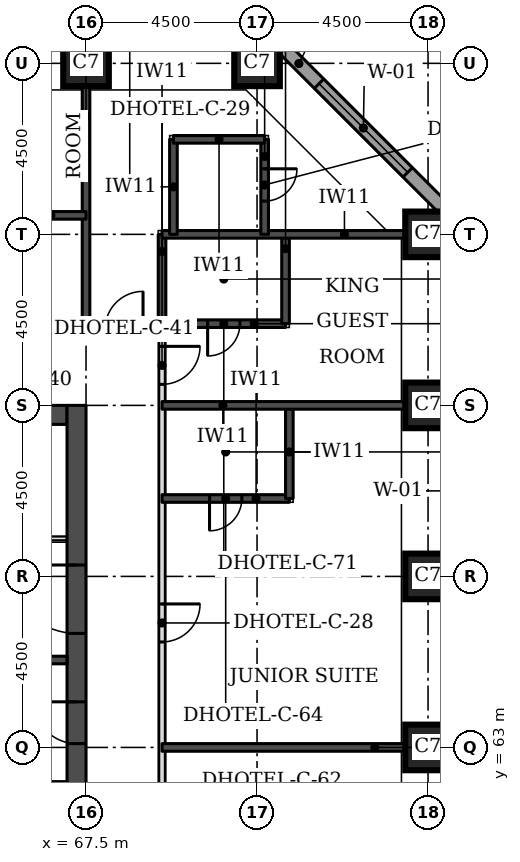
"""IFC4 building model, lengths in metres.
Left out: names, types, materials, properties, quantities, classifications, styles, units other than length and angle.
Written with IfcOpenShell. Run it as: python <this file> out.ifc"""

import sys

from ifc_helpers import new_model, si_unit, direction, frame, frame_2d, origin, origin_2d, place, context, subcontext, project, spatial, rectangle, extrude, element, fill, save


model = new_model("IFC4")
c1 = context("Model", 3, precision=1e-05, world=origin(), true_north=direction((0.0, 1.0)))
c2 = subcontext(c1, "Body", "Model", "MODEL_VIEW")
j1 = project(units=[si_unit("LENGTHUNIT", "METRE"), si_unit("PLANEANGLEUNIT", "RADIAN")], contexts=[c1])
p1 = place(None, origin())
s1 = spatial("IfcSite", under=j1, at=p1, CompositionType="ELEMENT")
p2 = place(p1, origin())
s2 = spatial("IfcBuilding", under=s1, at=p2, CompositionType="ELEMENT")
p3 = place(p2, frame((0.0, 0.0, 33.0)))
s3 = spatial("IfcBuildingStorey", under=s2, at=p3, CompositionType="ELEMENT", Elevation=33.0)
for number, where, z_axis, x_axis in (
    (1, (76.5, 63.0, 0.0), (0.0, 0.0, 1.0), (1.0, 0.0, 0.0)),
    (2, (76.5, 67.5, 0.0), (0.0, 0.0, 1.0), (1.0, 0.0, 0.0)),
    (3, (76.5, 72.0, 0.0), (0.0, 0.0, 1.0), (1.0, 0.0, 0.0)),
    (4, (76.5, 76.5, 0.0), (0.0, 0.0, 1.0), (1.0, 0.0, 0.0)),
    (5, (67.5, 81.0, 0.0), (0.0, 0.0, 1.0), (1.0, 0.0, 0.0)),
    (6, (72.0, 81.0, 0.0), (0.0, 0.0, 1.0), (1.0, 0.0, 0.0)),
):
    element("IfcColumn", number, at=place(p3, frame(where, z_axis=z_axis, x_axis=x_axis)), inside=s3, PredefinedType="COLUMN", context=c2, shape_type="SweptSolid", body=[
        extrude(rectangle(XDim=1.2, YDim=1.2, at=origin_2d()), origin(), (0.0, 0.0, 1.0), 3.3),
    ])
p4 = place(p3, frame((45.5, 71.75, 0.0), z_axis=(0.0, 0.0, 1.0), x_axis=(1.0, 0.0, 0.0)))
e7 = element("IfcWall", 7, at=p4, inside=s3, PredefinedType="SHEAR", context=c2, shape_type="SweptSolid", body=[
    extrude(rectangle(XDim=21.5, YDim=0.5, at=frame_2d((10.75, 0.0))), origin(), (0.0, 0.0, 1.0), 3.3),
])
p5 = place(p3, frame((67.25, 49.5, 0.0), z_axis=(0.0, 0.0, 1.0), x_axis=(0.0, 1.0, 0.0)))
e8 = element("IfcWall", 8, at=p5, inside=s3, PredefinedType="SHEAR", context=c2, shape_type="SweptSolid", body=[
    extrude(rectangle(XDim=22.5, YDim=0.5, at=frame_2d((11.25, 0.0))), origin(), (0.0, 0.0, 1.0), 3.3),
])
p6 = place(p5, frame((4.2, 0.0, 0.0)))
e9 = element("IfcOpeningElement", 9, at=p6, cuts=e8, PredefinedType="OPENING", context=c2, shape_type="SweptSolid", body=[
    extrude(rectangle(XDim=1.8, YDim=2.1, at=frame_2d((0.9, 1.05))), frame((0.0, 0.26, 0.0), z_axis=(0.0, -1.0, 0.0), x_axis=(1.0, 0.0, 0.0)), (0.0, 0.0, 1.0), 0.52),
])
p7 = place(p5, frame((6.9, 0.0, 0.0)))
e10 = element("IfcOpeningElement", 10, at=p7, cuts=e8, PredefinedType="OPENING", context=c2, shape_type="SweptSolid", body=[
    extrude(rectangle(XDim=1.1, YDim=2.1, at=frame_2d((0.55, 1.05))), frame((0.0, 0.26, 0.0), z_axis=(0.0, -1.0, 0.0), x_axis=(1.0, 0.0, 0.0)), (0.0, 0.0, 1.0), 0.52),
])
p8 = place(p5, frame((13.6, 0.0, 0.0)))
e11 = element("IfcOpeningElement", 11, at=p8, cuts=e8, PredefinedType="OPENING", context=c2, shape_type="SweptSolid", body=[
    extrude(rectangle(XDim=1.1, YDim=2.1, at=frame_2d((0.55, 1.05))), frame((0.0, 0.26, 0.0), z_axis=(0.0, -1.0, 0.0), x_axis=(1.0, 0.0, 0.0)), (0.0, 0.0, 1.0), 0.52),
])
p9 = place(p5, frame((16.5, 0.0, 0.0)))
e12 = element("IfcOpeningElement", 12, at=p9, cuts=e8, PredefinedType="OPENING", context=c2, shape_type="SweptSolid", body=[
    extrude(rectangle(XDim=1.8, YDim=2.1, at=frame_2d((0.9, 1.05))), frame((0.0, 0.26, 0.0), z_axis=(0.0, -1.0, 0.0), x_axis=(1.0, 0.0, 0.0)), (0.0, 0.0, 1.0), 0.52),
])
p10 = place(p3, frame((77.326, 76.77, 0.0), z_axis=(0.0, 0.0, 1.0), x_axis=(-0.707106781187, 0.707106781187, 0.0)))
e13 = element("IfcWall", 13, at=p10, inside=s3, PredefinedType="STANDARD", context=c2, shape_type="SweptSolid", body=[
    extrude(rectangle(XDim=7.151, YDim=0.35, at=frame_2d((3.576, 0.0))), origin(), (0.0, 0.0, 1.0), 3.055),
])
p11 = place(p10, frame((1.926, 0.0, 0.8)))
e14 = element("IfcOpeningElement", 14, at=p11, cuts=e13, PredefinedType="OPENING", context=c2, shape_type="SweptSolid", body=[
    extrude(rectangle(XDim=3.3, YDim=1.5, at=frame_2d((1.65, 0.75))), frame((0.0, 0.185, 0.0), z_axis=(0.0, -1.0, 0.0), x_axis=(1.0, 0.0, 0.0)), (0.0, 0.0, 1.0), 0.37),
])
p12 = place(p3, frame((69.5, 47.5, 0.0), z_axis=(0.0, 0.0, 1.0), x_axis=(0.0, 1.0, 0.0)))
e15 = element("IfcWall", 15, at=p12, inside=s3, PredefinedType="PARTITIONING", context=c2, shape_type="SweptSolid", body=[
    extrude(rectangle(XDim=26.5, YDim=0.15, at=frame_2d((13.25, 0.0))), origin(), (0.0, 0.0, 1.0), 3.08),
])
p13 = place(p12, frame((25.053, 0.0, 0.0)))
e16 = element("IfcOpeningElement", 16, at=p13, cuts=e15, PredefinedType="OPENING", context=c2, shape_type="SweptSolid", body=[
    extrude(rectangle(XDim=1.0, YDim=2.1, at=frame_2d((0.5, 1.05))), frame((0.0, 0.085, 0.0), z_axis=(0.0, -1.0, 0.0), x_axis=(1.0, 0.0, 0.0)), (0.0, 0.0, 1.0), 0.17),
])
p14 = place(p12, frame((18.275, 0.0, 0.0)))
e17 = element("IfcOpeningElement", 17, at=p14, cuts=e15, PredefinedType="OPENING", context=c2, shape_type="SweptSolid", body=[
    extrude(rectangle(XDim=1.0, YDim=2.1, at=frame_2d((0.5, 1.05))), frame((0.0, 0.085, 0.0), z_axis=(0.0, -1.0, 0.0), x_axis=(1.0, 0.0, 0.0)), (0.0, 0.0, 1.0), 0.17),
])
p15 = place(p12, frame((12.15, 0.0, 0.0)))
e18 = element("IfcOpeningElement", 18, at=p15, cuts=e15, PredefinedType="OPENING", context=c2, shape_type="SweptSolid", body=[
    extrude(rectangle(XDim=1.1, YDim=2.1, at=frame_2d((0.55, 1.05))), frame((0.0, 0.085, 0.0), z_axis=(0.0, -1.0, 0.0), x_axis=(1.0, 0.0, 0.0)), (0.0, 0.0, 1.0), 0.17),
])
p16 = place(p12, frame((2.825, 0.0, 0.0)))
e19 = element("IfcOpeningElement", 19, at=p16, cuts=e15, PredefinedType="OPENING", context=c2, shape_type="SweptSolid", body=[
    extrude(rectangle(XDim=1.0, YDim=2.1, at=frame_2d((0.5, 1.05))), frame((0.0, 0.085, 0.0), z_axis=(0.0, -1.0, 0.0), x_axis=(1.0, 0.0, 0.0)), (0.0, 0.0, 1.0), 0.17),
])
p17 = place(p12, frame((0.447, 0.0, 0.0)))
e20 = element("IfcOpeningElement", 20, at=p17, cuts=e15, PredefinedType="OPENING", context=c2, shape_type="SweptSolid", body=[
    extrude(rectangle(XDim=1.0, YDim=2.1, at=frame_2d((0.5, 1.05))), frame((0.0, 0.085, 0.0), z_axis=(0.0, -1.0, 0.0), x_axis=(1.0, 0.0, 0.0)), (0.0, 0.0, 1.0), 0.17),
])
p18 = place(p3, frame((43.0, 74.0, 0.0), z_axis=(0.0, 0.0, 1.0), x_axis=(1.0, 0.0, 0.0)))
e21 = element("IfcWall", 21, at=p18, inside=s3, PredefinedType="PARTITIONING", context=c2, shape_type="SweptSolid", body=[
    extrude(rectangle(XDim=26.5, YDim=0.15, at=frame_2d((13.25, 0.0))), origin(), (0.0, 0.0, 1.0), 3.08),
])
p19 = place(p18, frame((2.825, 0.0, 0.0)))
e22 = element("IfcOpeningElement", 22, at=p19, cuts=e21, PredefinedType="OPENING", context=c2, shape_type="SweptSolid", body=[
    extrude(rectangle(XDim=1.0, YDim=2.1, at=frame_2d((0.5, 1.05))), frame((0.0, 0.085, 0.0), z_axis=(0.0, -1.0, 0.0), x_axis=(1.0, 0.0, 0.0)), (0.0, 0.0, 1.0), 0.17),
])
p20 = place(p18, frame((9.425, 0.0, 0.0)))
e23 = element("IfcOpeningElement", 23, at=p20, cuts=e21, PredefinedType="OPENING", context=c2, shape_type="SweptSolid", body=[
    extrude(rectangle(XDim=1.0, YDim=2.1, at=frame_2d((0.5, 1.05))), frame((0.0, 0.085, 0.0), z_axis=(0.0, -1.0, 0.0), x_axis=(1.0, 0.0, 0.0)), (0.0, 0.0, 1.0), 0.17),
])
p21 = place(p18, frame((11.825, 0.0, 0.0)))
e24 = element("IfcOpeningElement", 24, at=p21, cuts=e21, PredefinedType="OPENING", context=c2, shape_type="SweptSolid", body=[
    extrude(rectangle(XDim=1.0, YDim=2.1, at=frame_2d((0.5, 1.05))), frame((0.0, 0.085, 0.0), z_axis=(0.0, -1.0, 0.0), x_axis=(1.0, 0.0, 0.0)), (0.0, 0.0, 1.0), 0.17),
])
p22 = place(p18, frame((18.425, 0.0, 0.0)))
e25 = element("IfcOpeningElement", 25, at=p22, cuts=e21, PredefinedType="OPENING", context=c2, shape_type="SweptSolid", body=[
    extrude(rectangle(XDim=1.0, YDim=2.1, at=frame_2d((0.5, 1.05))), frame((0.0, 0.085, 0.0), z_axis=(0.0, -1.0, 0.0), x_axis=(1.0, 0.0, 0.0)), (0.0, 0.0, 1.0), 0.17),
])
p23 = place(p18, frame((20.825, 0.0, 0.0)))
e26 = element("IfcOpeningElement", 26, at=p23, cuts=e21, PredefinedType="OPENING", context=c2, shape_type="SweptSolid", body=[
    extrude(rectangle(XDim=1.0, YDim=2.1, at=frame_2d((0.5, 1.05))), frame((0.0, 0.085, 0.0), z_axis=(0.0, -1.0, 0.0), x_axis=(1.0, 0.0, 0.0)), (0.0, 0.0, 1.0), 0.17),
])
p24 = place(p18, frame((0.5, 0.0, 0.0)))
e27 = element("IfcOpeningElement", 27, at=p24, cuts=e21, PredefinedType="OPENING", context=c2, shape_type="SweptSolid", body=[
    extrude(rectangle(XDim=1.0, YDim=2.1, at=frame_2d((0.5, 1.05))), frame((0.0, 0.085, 0.0), z_axis=(0.0, -1.0, 0.0), x_axis=(1.0, 0.0, 0.0)), (0.0, 0.0, 1.0), 0.17),
])
p25 = place(p18, frame((25.0, 0.0, 0.0)))
e28 = element("IfcOpeningElement", 28, at=p25, cuts=e21, PredefinedType="OPENING", context=c2, shape_type="SweptSolid", body=[
    extrude(rectangle(XDim=1.0, YDim=2.1, at=frame_2d((0.5, 1.05))), frame((0.0, 0.085, 0.0), z_axis=(0.0, -1.0, 0.0), x_axis=(1.0, 0.0, 0.0)), (0.0, 0.0, 1.0), 0.17),
])
p26 = place(p3, frame((69.5, 63.0, 0.0), z_axis=(0.0, 0.0, 1.0), x_axis=(1.0, 0.0, 0.0)))
e29 = element("IfcWall", 29, at=p26, inside=s3, PredefinedType="SOLIDWALL", context=c2, shape_type="SweptSolid", body=[
    extrude(rectangle(XDim=6.4, YDim=0.2, at=frame_2d((3.2, 0.0))), origin(), (0.0, 0.0, 1.0), 3.08),
])
p27 = place(p3, frame((69.5, 69.55, 0.0), z_axis=(0.0, 0.0, 1.0), x_axis=(1.0, 0.0, 0.0)))
e30 = element("IfcWall", 30, at=p27, inside=s3, PredefinedType="SOLIDWALL", context=c2, shape_type="SweptSolid", body=[
    extrude(rectangle(XDim=3.35, YDim=0.2, at=frame_2d((1.675, 0.0))), origin(), (0.0, 0.0, 1.0), 3.08),
])
p28 = place(p27, frame((1.25, 0.0, 0.0)))
e31 = element("IfcOpeningElement", 31, at=p28, cuts=e30, PredefinedType="OPENING", context=c2, shape_type="SweptSolid", body=[
    extrude(rectangle(XDim=0.85, YDim=2.1, at=frame_2d((0.425, 1.05))), frame((0.0, 0.11, 0.0), z_axis=(0.0, -1.0, 0.0), x_axis=(1.0, 0.0, 0.0)), (0.0, 0.0, 1.0), 0.22),
])
p29 = place(p3, frame((72.85, 69.55, 0.0), z_axis=(0.0, 0.0, 1.0), x_axis=(0.0, 1.0, 0.0)))
e32 = element("IfcWall", 32, at=p29, inside=s3, PredefinedType="SOLIDWALL", context=c2, shape_type="SweptSolid", body=[
    extrude(rectangle(XDim=2.45, YDim=0.2, at=frame_2d((1.225, 0.0))), origin(), (0.0, 0.0, 1.0), 3.08),
])
for number, where, z_axis, x_axis in (
    (33, (69.5, 72.0, 0.0), (0.0, 0.0, 1.0), (1.0, 0.0, 0.0)),
    (34, (67.5, 74.0, 0.0), (0.0, 0.0, 1.0), (0.0, 1.0, 0.0)),
):
    element("IfcWall", number, at=place(p3, frame(where, z_axis=z_axis, x_axis=x_axis)), inside=s3, PredefinedType="SOLIDWALL", context=c2, shape_type="SweptSolid", body=[
        extrude(rectangle(XDim=6.4, YDim=0.2, at=frame_2d((3.2, 0.0))), origin(), (0.0, 0.0, 1.0), 3.08),
    ])
p30 = place(p3, frame((69.5, 74.0, 0.0), z_axis=(0.0, 0.0, 1.0), x_axis=(0.0, 1.0, 0.0)))
e35 = element("IfcWall", 35, at=p30, inside=s3, PredefinedType="SOLIDWALL", context=c2, shape_type="SweptSolid", body=[
    extrude(rectangle(XDim=2.5, YDim=0.2, at=frame_2d((1.25, 0.0))), origin(), (0.0, 0.0, 1.0), 3.08),
])
p31 = place(p3, frame((69.5, 74.15, 0.0), z_axis=(0.0, 0.0, 1.0), x_axis=(1.0, 0.0, 0.0)))
e36 = element("IfcWall", 36, at=p31, inside=s3, PredefinedType="SOLIDWALL", context=c2, shape_type="SweptSolid", body=[
    extrude(rectangle(XDim=3.25, YDim=0.2, at=frame_2d((1.625, 0.0))), origin(), (0.0, 0.0, 1.0), 3.08),
])
p32 = place(p31, frame((1.2, 0.0, 0.0)))
e37 = element("IfcOpeningElement", 37, at=p32, cuts=e36, PredefinedType="OPENING", context=c2, shape_type="SweptSolid", body=[
    extrude(rectangle(XDim=0.85, YDim=2.1, at=frame_2d((0.425, 1.05))), frame((0.0, 0.11, 0.0), z_axis=(0.0, -1.0, 0.0), x_axis=(1.0, 0.0, 0.0)), (0.0, 0.0, 1.0), 0.22),
])
p33 = place(p3, frame((72.75, 74.15, 0.0), z_axis=(0.0, 0.0, 1.0), x_axis=(0.0, 1.0, 0.0)))
e38 = element("IfcWall", 38, at=p33, inside=s3, PredefinedType="SOLIDWALL", context=c2, shape_type="SweptSolid", body=[
    extrude(rectangle(XDim=2.35, YDim=0.2, at=frame_2d((1.175, 0.0))), origin(), (0.0, 0.0, 1.0), 3.08),
])
p34 = place(p3, frame((69.5, 76.5, 0.0), z_axis=(0.0, 0.0, 1.0), x_axis=(1.0, 0.0, 0.0)))
e39 = element("IfcWall", 39, at=p34, inside=s3, PredefinedType="SOLIDWALL", context=c2, shape_type="SweptSolid", body=[
    extrude(rectangle(XDim=6.4, YDim=0.2, at=frame_2d((3.2, 0.0))), origin(), (0.0, 0.0, 1.0), 3.08),
])
p35 = place(p3, frame((69.8, 76.5, 0.0), z_axis=(0.0, 0.0, 1.0), x_axis=(0.0, 1.0, 0.0)))
e40 = element("IfcWall", 40, at=p35, inside=s3, PredefinedType="SOLIDWALL", context=c2, shape_type="SweptSolid", body=[
    extrude(rectangle(XDim=2.5, YDim=0.2, at=frame_2d((1.25, 0.0))), origin(), (0.0, 0.0, 1.0), 3.08),
])
p36 = place(p3, frame((72.2, 76.5, 0.0), z_axis=(0.0, 0.0, 1.0), x_axis=(0.0, 1.0, 0.0)))
e41 = element("IfcWall", 41, at=p36, inside=s3, PredefinedType="SOLIDWALL", context=c2, shape_type="SweptSolid", body=[
    extrude(rectangle(XDim=2.5, YDim=0.2, at=frame_2d((1.25, 0.0))), origin(), (0.0, 0.0, 1.0), 3.08),
])
p37 = place(p36, frame((0.875, 0.0, 0.0)))
e42 = element("IfcOpeningElement", 42, at=p37, cuts=e41, PredefinedType="OPENING", context=c2, shape_type="SweptSolid", body=[
    extrude(rectangle(XDim=0.85, YDim=2.1, at=frame_2d((0.425, 1.05))), frame((0.0, 0.11, 0.0), z_axis=(0.0, -1.0, 0.0), x_axis=(1.0, 0.0, 0.0)), (0.0, 0.0, 1.0), 0.22),
])
p38 = place(p3, frame((65.65, 77.0, 0.0), z_axis=(0.0, 0.0, 1.0), x_axis=(1.0, 0.0, 0.0)))
e43 = element("IfcWall", 43, at=p38, inside=s3, PredefinedType="SOLIDWALL", context=c2, shape_type="SweptSolid", body=[
    extrude(rectangle(XDim=1.85, YDim=0.2, at=frame_2d((0.925, 0.0))), origin(), (0.0, 0.0, 1.0), 3.08),
])
p39 = place(p3, frame((69.8, 79.0, 0.0), z_axis=(0.0, 0.0, 1.0), x_axis=(1.0, 0.0, 0.0)))
e44 = element("IfcWall", 44, at=p39, inside=s3, PredefinedType="SOLIDWALL", context=c2, shape_type="SweptSolid", body=[
    extrude(rectangle(XDim=2.4, YDim=0.2, at=frame_2d((1.2, 0.0))), origin(), (0.0, 0.0, 1.0), 3.08),
])
p40 = place(p3, frame((64.7, 65.3, 0.0), z_axis=(0.0, 0.0, 1.0), x_axis=(1.0, 0.0, 0.0)))
e45 = element("IfcWall", 45, at=p40, inside=s3, PredefinedType="SOLIDWALL", context=c2, shape_type="SweptSolid", body=[
    extrude(rectangle(XDim=2.3, YDim=0.2, at=frame_2d((1.15, 0.0))), origin(), (0.0, 0.0, 1.0), 3.08),
])
p41 = place(p3, frame((61.85, 68.5, 0.0), z_axis=(0.0, 0.0, 1.0), x_axis=(1.0, 0.0, 0.0)))
e46 = element("IfcWall", 46, at=p41, inside=s3, PredefinedType="PARTITIONING", context=c2, shape_type="SweptSolid", body=[
    extrude(rectangle(XDim=5.15, YDim=0.1, at=frame_2d((2.575, 0.0))), origin(), (0.0, 0.0, 1.0), 3.08),
])
p42 = place(p41, frame((3.026, 0.0, 0.0)))
e47 = element("IfcOpeningElement", 47, at=p42, cuts=e46, PredefinedType="OPENING", context=c2, shape_type="SweptSolid", body=[
    extrude(rectangle(XDim=0.9, YDim=2.1, at=frame_2d((0.45, 1.05))), frame((0.0, 0.06, 0.0), z_axis=(0.0, -1.0, 0.0), x_axis=(1.0, 0.0, 0.0)), (0.0, 0.0, 1.0), 0.12),
])
p43 = place(p41, frame((0.451, 0.0, 0.0)))
e48 = element("IfcOpeningElement", 48, at=p43, cuts=e46, PredefinedType="OPENING", context=c2, shape_type="SweptSolid", body=[
    extrude(rectangle(XDim=0.9, YDim=2.1, at=frame_2d((0.45, 1.05))), frame((0.0, 0.06, 0.0), z_axis=(0.0, -1.0, 0.0), x_axis=(1.0, 0.0, 0.0)), (0.0, 0.0, 1.0), 0.12),
])
p44 = place(p11, origin())
e49 = element("IfcWindow", 49, at=p44, inside=s3, PartitioningType="SINGLE_PANEL", PredefinedType="WINDOW", context=c2, shape_type="SweptSolid", body=[
    extrude(rectangle(XDim=3.3, YDim=1.5, at=frame_2d((1.65, 0.75))), frame((0.0, 0.085, 0.0), z_axis=(0.0, -1.0, 0.0), x_axis=(1.0, 0.0, 0.0)), (0.0, 0.0, 1.0), 0.06),
])
fill(e14, e49)
p45 = place(p13, frame((1.0, 0.0, 0.0), z_axis=(0.0, 0.0, 1.0), x_axis=(-1.0, 0.0, 0.0)))
e50 = element("IfcDoor", 50, at=p45, inside=s3, OperationType="SINGLE_SWING_LEFT", PredefinedType="DOOR", context=c2, shape_type="SweptSolid", body=[
    extrude(rectangle(XDim=1.0, YDim=2.1, at=frame_2d((0.5, 1.05))), frame((0.0, 0.025, 0.0), z_axis=(0.0, -1.0, 0.0), x_axis=(1.0, 0.0, 0.0)), (0.0, 0.0, 1.0), 0.05),
])
fill(e16, e50)
p46 = place(p32, frame((0.85, 0.0, 0.0), z_axis=(0.0, 0.0, 1.0), x_axis=(-1.0, 0.0, 0.0)))
e51 = element("IfcDoor", 51, at=p46, inside=s3, OperationType="SINGLE_SWING_RIGHT", PredefinedType="DOOR", context=c2, shape_type="SweptSolid", body=[
    extrude(rectangle(XDim=0.85, YDim=2.1, at=frame_2d((0.425, 1.05))), frame((0.0, 0.025, 0.0), z_axis=(0.0, -1.0, 0.0), x_axis=(1.0, 0.0, 0.0)), (0.0, 0.0, 1.0), 0.05),
])
fill(e37, e51)
p47 = place(p14, frame((1.0, 0.0, 0.0), z_axis=(0.0, 0.0, 1.0), x_axis=(-1.0, 0.0, 0.0)))
e52 = element("IfcDoor", 52, at=p47, inside=s3, OperationType="SINGLE_SWING_LEFT", PredefinedType="DOOR", context=c2, shape_type="SweptSolid", body=[
    extrude(rectangle(XDim=1.0, YDim=2.1, at=frame_2d((0.5, 1.05))), frame((0.0, 0.025, 0.0), z_axis=(0.0, -1.0, 0.0), x_axis=(1.0, 0.0, 0.0)), (0.0, 0.0, 1.0), 0.05),
])
fill(e17, e52)
p48 = place(p28, frame((0.85, 0.0, 0.0), z_axis=(0.0, 0.0, 1.0), x_axis=(-1.0, 0.0, 0.0)))
e53 = element("IfcDoor", 53, at=p48, inside=s3, OperationType="SINGLE_SWING_RIGHT", PredefinedType="DOOR", context=c2, shape_type="SweptSolid", body=[
    extrude(rectangle(XDim=0.85, YDim=2.1, at=frame_2d((0.425, 1.05))), frame((0.0, 0.025, 0.0), z_axis=(0.0, -1.0, 0.0), x_axis=(1.0, 0.0, 0.0)), (0.0, 0.0, 1.0), 0.05),
])
fill(e31, e53)
p49 = place(p25, origin())
e54 = element("IfcDoor", 54, at=p49, inside=s3, OperationType="SINGLE_SWING_RIGHT", PredefinedType="DOOR", context=c2, shape_type="SweptSolid", body=[
    extrude(rectangle(XDim=1.0, YDim=2.1, at=frame_2d((0.5, 1.05))), frame((0.0, 0.025, 0.0), z_axis=(0.0, -1.0, 0.0), x_axis=(1.0, 0.0, 0.0)), (0.0, 0.0, 1.0), 0.05),
])
fill(e28, e54)
p50 = place(p37, frame((0.85, 0.0, 0.0), z_axis=(0.0, 0.0, 1.0), x_axis=(-1.0, 0.0, 0.0)))
e55 = element("IfcDoor", 55, at=p50, inside=s3, OperationType="SINGLE_SWING_LEFT", PredefinedType="DOOR", context=c2, shape_type="SweptSolid", body=[
    extrude(rectangle(XDim=0.85, YDim=2.1, at=frame_2d((0.425, 1.05))), frame((0.0, 0.025, 0.0), z_axis=(0.0, -1.0, 0.0), x_axis=(1.0, 0.0, 0.0)), (0.0, 0.0, 1.0), 0.05),
])
fill(e42, e55)
p51 = place(p8, origin())
e56 = element("IfcDoor", 56, at=p51, inside=s3, OperationType="SINGLE_SWING_RIGHT", PredefinedType="DOOR", context=c2, shape_type="SweptSolid", body=[
    extrude(rectangle(XDim=1.1, YDim=2.1, at=frame_2d((0.55, 1.05))), frame((0.0, 0.025, 0.0), z_axis=(0.0, -1.0, 0.0), x_axis=(1.0, 0.0, 0.0)), (0.0, 0.0, 1.0), 0.05),
])
fill(e11, e56)
p52 = place(p9, origin())
e57 = element("IfcDoor", 57, at=p52, inside=s3, OperationType="SINGLE_SWING_RIGHT", PredefinedType="DOOR", context=c2, shape_type="SweptSolid", body=[
    extrude(rectangle(XDim=1.8, YDim=2.1, at=frame_2d((0.9, 1.05))), frame((0.0, 0.025, 0.0), z_axis=(0.0, -1.0, 0.0), x_axis=(1.0, 0.0, 0.0)), (0.0, 0.0, 1.0), 0.05),
])
fill(e12, e57)
save(model, sys.argv[1])
